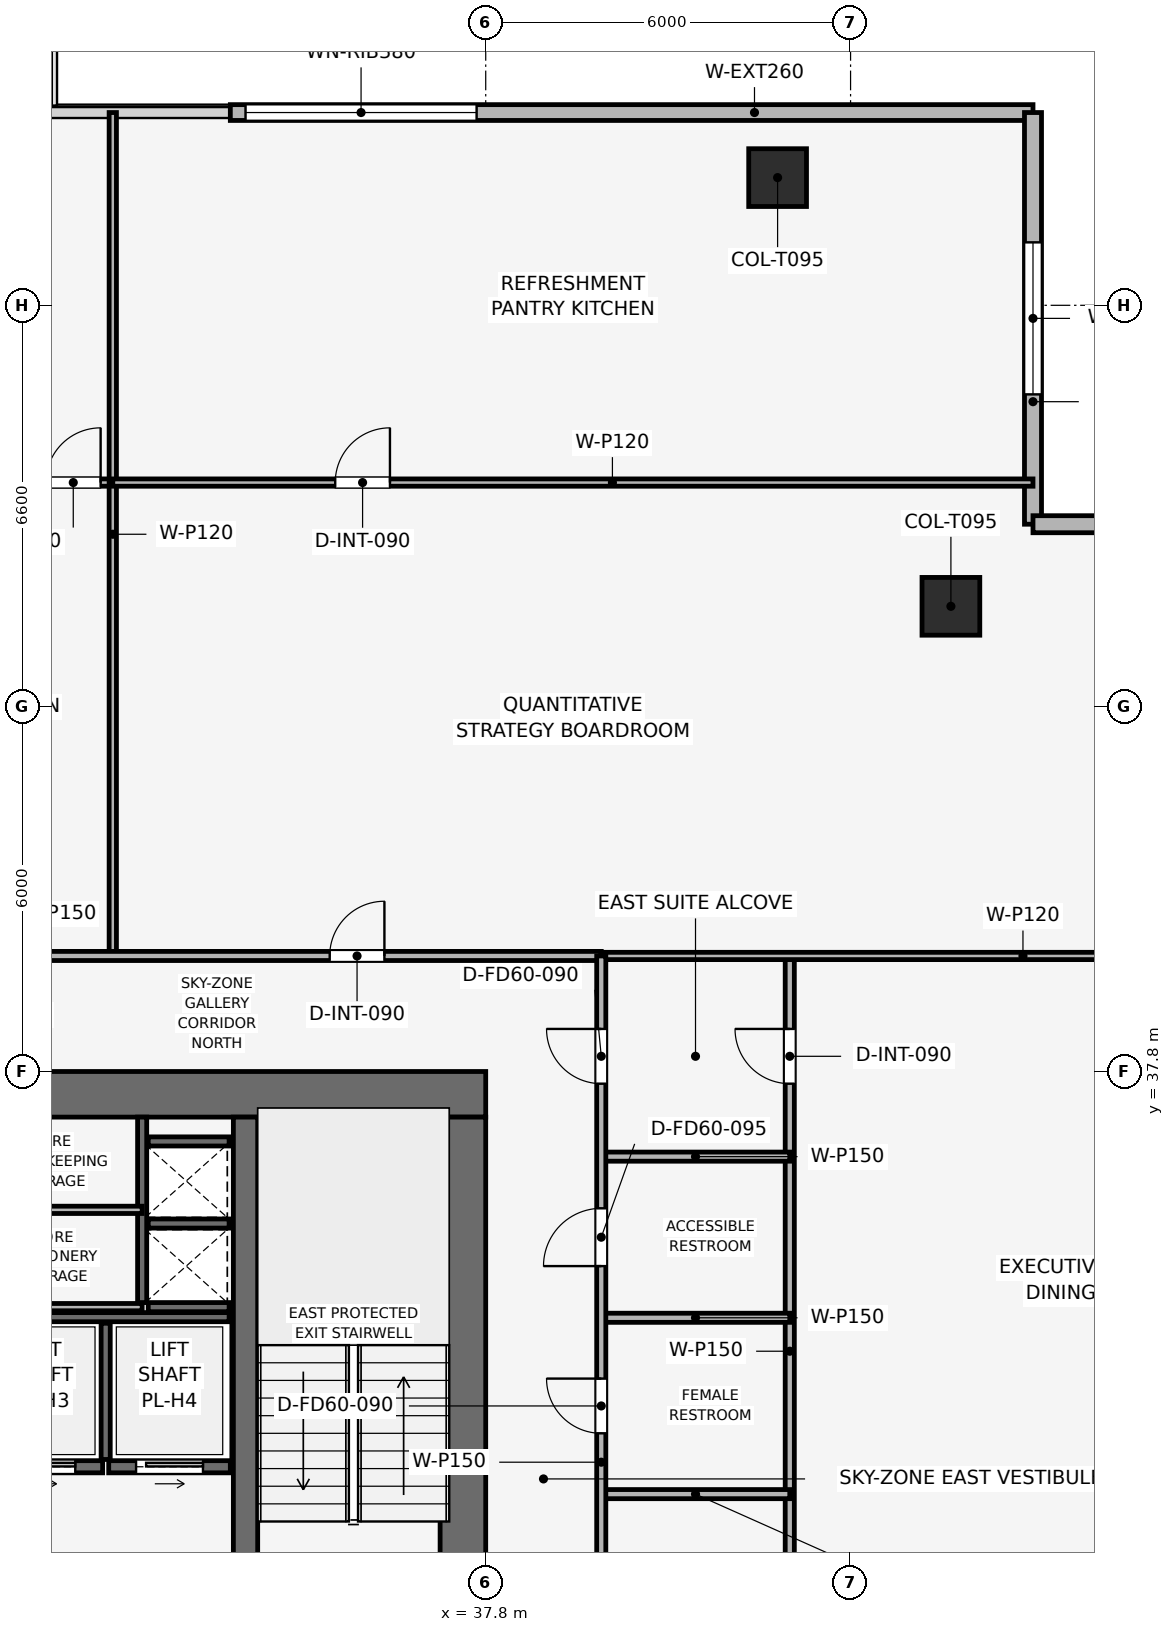
"""IFC4 building model, lengths in metres.
Left out: names, types, materials, properties, quantities, classifications, styles, units other than length and angle.
Written with IfcOpenShell. Run it as: python <this file> out.ifc"""

import sys

from ifc_helpers import new_model, si_unit, direction, frame, frame_2d, origin, origin_2d, place, context, subcontext, project, spatial, rectangle, extrude, element, fill, save


model = new_model("IFC4")
c1 = context("Model", 3, precision=1e-05, world=origin(), true_north=direction((0.0, 1.0)))
c2 = subcontext(c1, "Body", "Model", "MODEL_VIEW")
j1 = project(units=[si_unit("LENGTHUNIT", "METRE"), si_unit("PLANEANGLEUNIT", "RADIAN")], contexts=[c1])
p1 = place(None, origin())
s1 = spatial("IfcSite", under=j1, at=p1, CompositionType="ELEMENT")
p2 = place(p1, origin())
s2 = spatial("IfcBuilding", under=s1, at=p2, CompositionType="ELEMENT")
p3 = place(p2, frame((0.0, 0.0, 269.1)))
s3 = spatial("IfcBuildingStorey", under=s2, at=p3, CompositionType="ELEMENT", Elevation=269.1)
p4 = place(p3, frame((19.8, 37.425, 0.0), z_axis=(0.0, 0.0, 1.0), x_axis=(1.0, 0.0, 0.0)))
e1 = element("IfcWall", 1, at=p4, inside=s3, PredefinedType="SHEAR", context=c2, shape_type="SweptSolid", body=[
    extrude(rectangle(XDim=18.0, YDim=0.75, at=frame_2d((9.0, 0.0))), origin(), (0.0, 0.0, 1.0), 3.75),
])
p5 = place(p4, frame((7.05, 0.0, 0.0)))
e2 = element("IfcOpeningElement", 2, at=p5, cuts=e1, PredefinedType="OPENING", context=c2, shape_type="SweptSolid", body=[
    extrude(rectangle(XDim=1.1, YDim=2.15, at=frame_2d((0.55, 1.075))), frame((0.0, 0.385, 0.0), z_axis=(0.0, -1.0, 0.0), x_axis=(1.0, 0.0, 0.0)), (0.0, 0.0, 1.0), 0.77),
])
p6 = place(p3, frame((37.425, 20.55, 0.0), z_axis=(0.0, 0.0, 1.0), x_axis=(0.0, 1.0, 0.0)))
e3 = element("IfcWall", 3, at=p6, inside=s3, PredefinedType="SHEAR", context=c2, shape_type="SweptSolid", body=[
    extrude(rectangle(XDim=16.5, YDim=0.75, at=frame_2d((8.25, 0.0))), origin(), (0.0, 0.0, 1.0), 3.75),
])
p7 = place(p6, frame((4.75, 0.0, 0.0)))
e4 = element("IfcOpeningElement", 4, at=p7, cuts=e3, PredefinedType="OPENING", context=c2, shape_type="SweptSolid", body=[
    extrude(rectangle(XDim=1.1, YDim=2.15, at=frame_2d((0.55, 1.075))), frame((0.0, 0.385, 0.0), z_axis=(0.0, -1.0, 0.0), x_axis=(1.0, 0.0, 0.0)), (0.0, 0.0, 1.0), 0.77),
])
p8 = place(p3, frame((33.85, 20.55, 0.0), z_axis=(0.0, 0.0, 1.0), x_axis=(0.0, 1.0, 0.0)))
e5 = element("IfcWall", 5, at=p8, inside=s3, PredefinedType="SHEAR", context=c2, shape_type="SweptSolid", body=[
    extrude(rectangle(XDim=16.5, YDim=0.4, at=frame_2d((8.25, 0.0))), origin(), (0.0, 0.0, 1.0), 3.75),
])
for number, where, z_axis, x_axis in (
    (6, (42.6, 52.5, 0.003), (0.0, 0.0, 1.0), (1.0, 0.0, 0.0)),
    (7, (45.45, 45.45, 0.003), (0.0, 0.0, 1.0), (1.0, 0.0, 0.0)),
):
    element("IfcColumn", number, at=place(p3, frame(where, z_axis=z_axis, x_axis=x_axis)), inside=s3, PredefinedType="COLUMN", context=c2, shape_type="SweptSolid", body=[
        extrude(rectangle(XDim=0.95, YDim=0.95, at=origin_2d()), origin(), (0.0, 0.0, 1.0), 3.494),
    ])
p9 = place(p3, frame((33.6, 53.57, 0.0), z_axis=(0.0, 0.0, 1.0), x_axis=(1.0, 0.0, 0.0)))
e8 = element("IfcWall", 8, at=p9, inside=s3, PredefinedType="SOLIDWALL", context=c2, shape_type="SweptSolid", body=[
    extrude(rectangle(XDim=13.2, YDim=0.26, at=frame_2d((6.6, 0.0))), origin(), (0.0, 0.0, 1.0), 3.5),
])
p10 = place(p9, frame((0.25, 0.0, 0.9)))
e9 = element("IfcOpeningElement", 9, at=p10, cuts=e8, PredefinedType="OPENING", context=c2, shape_type="SweptSolid", body=[
    extrude(rectangle(XDim=3.8, YDim=1.9, at=frame_2d((1.9, 0.95))), frame((0.0, 0.14, 0.0), z_axis=(0.0, -1.0, 0.0), x_axis=(1.0, 0.0, 0.0)), (0.0, 0.0, 1.0), 0.28),
])
p11 = place(p3, frame((46.8, 53.57, 0.0), z_axis=(0.0, 0.0, 1.0), x_axis=(0.0, -1.0, 0.0)))
e10 = element("IfcWall", 10, at=p11, inside=s3, PredefinedType="SOLIDWALL", context=c2, shape_type="SweptSolid", body=[
    extrude(rectangle(XDim=6.77, YDim=0.28, at=frame_2d((3.385, 0.0))), origin(), (0.0, 0.0, 1.0), 3.5),
])
p12 = place(p11, frame((2.135, 0.0, 0.9)))
e11 = element("IfcOpeningElement", 11, at=p12, cuts=e10, PredefinedType="OPENING", context=c2, shape_type="SweptSolid", body=[
    extrude(rectangle(XDim=2.5, YDim=1.9, at=frame_2d((1.25, 0.95))), frame((0.0, 0.15, 0.0), z_axis=(0.0, -1.0, 0.0), x_axis=(1.0, 0.0, 0.0)), (0.0, 0.0, 1.0), 0.3),
])
p13 = place(p3, frame((46.8, 46.8, 0.0), z_axis=(0.0, 0.0, 1.0), x_axis=(1.0, 0.0, 0.0)))
e12 = element("IfcWall", 12, at=p13, inside=s3, PredefinedType="SOLIDWALL", context=c2, shape_type="SweptSolid", body=[
    extrude(rectangle(XDim=6.77, YDim=0.28, at=frame_2d((3.385, 0.0))), origin(), (0.0, 0.0, 1.0), 3.5),
])
p14 = place(p13, frame((2.135, 0.0, 0.9)))
e13 = element("IfcOpeningElement", 13, at=p14, cuts=e12, PredefinedType="OPENING", context=c2, shape_type="SweptSolid", body=[
    extrude(rectangle(XDim=2.5, YDim=1.9, at=frame_2d((1.25, 0.95))), frame((0.0, 0.15, 0.0), z_axis=(0.0, -1.0, 0.0), x_axis=(1.0, 0.0, 0.0)), (0.0, 0.0, 1.0), 0.3),
])
p15 = place(p3, frame((32.15, 34.0, 0.0), z_axis=(0.0, 0.0, 1.0), x_axis=(0.0, 1.0, 0.0)))
e14 = element("IfcWall", 14, at=p15, inside=s3, PredefinedType="SHEAR", context=c2, shape_type="SweptSolid", body=[
    extrude(rectangle(XDim=3.05, YDim=0.15, at=frame_2d((1.525, 0.0))), origin(), (0.0, 0.0, 1.0), 3.5),
])
for number, where, z_axis, x_axis in (
    (15, (32.25, 33.925, 0.0), (0.0, 0.0, 1.0), (1.0, 0.0, 0.0)),
    (16, (32.25, 35.3, 0.0), (0.0, 0.0, 1.0), (1.0, 0.0, 0.0)),
):
    element("IfcWall", number, at=place(p3, frame(where, z_axis=z_axis, x_axis=x_axis)), inside=s3, PredefinedType="SHEAR", context=c2, shape_type="SweptSolid", body=[
        extrude(rectangle(XDim=1.33, YDim=0.15, at=frame_2d((0.665, 0.0))), origin(), (0.0, 0.0, 1.0), 3.5),
    ])
p16 = place(p3, frame((29.5, 31.3, 0.0), z_axis=(0.0, 0.0, 1.0), x_axis=(1.0, 0.0, 0.0)))
e17 = element("IfcWall", 17, at=p16, inside=s3, PredefinedType="SHEAR", context=c2, shape_type="SweptSolid", body=[
    extrude(rectangle(XDim=2.0, YDim=0.2, at=frame_2d((1.0, 0.0))), origin(), (0.0, 0.0, 1.0), 3.5),
])
p17 = place(p16, frame((0.45, 0.0, 0.0)))
e18 = element("IfcOpeningElement", 18, at=p17, cuts=e17, PredefinedType="OPENING", context=c2, shape_type="SweptSolid", body=[
    extrude(rectangle(XDim=1.1, YDim=2.15, at=frame_2d((0.55, 1.075))), frame((0.0, 0.11, 0.0), z_axis=(0.0, -1.0, 0.0), x_axis=(1.0, 0.0, 0.0)), (0.0, 0.0, 1.0), 0.22),
])
p18 = place(p3, frame((31.6, 31.3, 0.0), z_axis=(0.0, 0.0, 1.0), x_axis=(1.0, 0.0, 0.0)))
e19 = element("IfcWall", 19, at=p18, inside=s3, PredefinedType="SHEAR", context=c2, shape_type="SweptSolid", body=[
    extrude(rectangle(XDim=2.0, YDim=0.2, at=frame_2d((1.0, 0.0))), origin(), (0.0, 0.0, 1.0), 3.5),
])
p19 = place(p18, frame((0.45, 0.0, 0.0)))
e20 = element("IfcOpeningElement", 20, at=p19, cuts=e19, PredefinedType="OPENING", context=c2, shape_type="SweptSolid", body=[
    extrude(rectangle(XDim=1.1, YDim=2.15, at=frame_2d((0.55, 1.075))), frame((0.0, 0.11, 0.0), z_axis=(0.0, -1.0, 0.0), x_axis=(1.0, 0.0, 0.0)), (0.0, 0.0, 1.0), 0.22),
])
p20 = place(p3, frame((32.25, 36.65, 0.0), z_axis=(0.0, 0.0, 1.0), x_axis=(1.0, 0.0, 0.0)))
e21 = element("IfcWall", 21, at=p20, inside=s3, PredefinedType="SHEAR", context=c2, shape_type="SweptSolid", body=[
    extrude(rectangle(XDim=1.33, YDim=0.15, at=frame_2d((0.665, 0.0))), origin(), (0.0, 0.0, 1.0), 3.5),
])
p21 = place(p3, frame((29.5, 33.76, 0.0), z_axis=(0.0, 0.0, 1.0), x_axis=(1.0, 0.0, 0.0)))
e22 = element("IfcWall", 22, at=p21, inside=s3, PredefinedType="SHEAR", context=c2, shape_type="SweptSolid", body=[
    extrude(rectangle(XDim=4.08, YDim=0.15, at=frame_2d((2.04, 0.0))), origin(), (0.0, 0.0, 1.0), 3.5),
])
p22 = place(p3, frame((31.55, 31.42, 0.0), z_axis=(0.0, 0.0, 1.0), x_axis=(0.0, 1.0, 0.0)))
e23 = element("IfcWall", 23, at=p22, inside=s3, PredefinedType="SHEAR", context=c2, shape_type="SweptSolid", body=[
    extrude(rectangle(XDim=2.24, YDim=0.15, at=frame_2d((1.12, 0.0))), origin(), (0.0, 0.0, 1.0), 3.5),
])
for number, where, z_axis, x_axis in (
    (24, (28.85, 35.525, 0.0), (0.0, 0.0, 1.0), (1.0, 0.0, 0.0)),
    (25, (28.85, 33.925, 0.0), (0.0, 0.0, 1.0), (1.0, 0.0, 0.0)),
):
    element("IfcWall", number, at=place(p3, frame(where, z_axis=z_axis, x_axis=x_axis)), inside=s3, PredefinedType="PARTITIONING", context=c2, shape_type="SweptSolid", body=[
        extrude(rectangle(XDim=3.3, YDim=0.12, at=frame_2d((1.65, 0.0))), origin(), (0.0, 0.0, 1.0), 3.5),
    ])
p23 = place(p3, frame((26.102, 47.485, 0.0), z_axis=(0.0, 0.0, 1.0), x_axis=(1.0, 0.0, 0.0)))
e26 = element("IfcWall", 26, at=p23, inside=s3, PredefinedType="PARTITIONING", context=c2, shape_type="SweptSolid", body=[
    extrude(rectangle(XDim=5.565, YDim=0.12, at=frame_2d((2.782, 0.0))), origin(), (0.0, 0.0, 1.0), 3.085),
])
p24 = place(p23, frame((4.465, 0.0, 0.0)))
e27 = element("IfcOpeningElement", 27, at=p24, cuts=e26, PredefinedType="OPENING", context=c2, shape_type="SweptSolid", body=[
    extrude(rectangle(XDim=0.9, YDim=2.1, at=frame_2d((0.45, 1.05))), frame((0.0, 0.07, 0.0), z_axis=(0.0, -1.0, 0.0), x_axis=(1.0, 0.0, 0.0)), (0.0, 0.0, 1.0), 0.14),
])
p25 = place(p3, frame((31.667, 39.7, 0.0), z_axis=(0.0, 0.0, 1.0), x_axis=(0.0, 1.0, 0.0)))
e28 = element("IfcWall", 28, at=p25, inside=s3, PredefinedType="PARTITIONING", context=c2, shape_type="SweptSolid", body=[
    extrude(rectangle(XDim=13.87, YDim=0.12, at=frame_2d((6.935, 0.0))), origin(), (0.0, 0.0, 1.0), 3.085),
])
p26 = place(p3, frame((31.667, 47.485, 0.0), z_axis=(0.0, 0.0, 1.0), x_axis=(1.0, 0.0, 0.0)))
e29 = element("IfcWall", 29, at=p26, inside=s3, PredefinedType="PARTITIONING", context=c2, shape_type="SweptSolid", body=[
    extrude(rectangle(XDim=15.133, YDim=0.12, at=frame_2d((7.566, 0.0))), origin(), (0.0, 0.0, 1.0), 3.085),
])
p27 = place(p26, frame((3.658, 0.0, 0.0)))
e30 = element("IfcOpeningElement", 30, at=p27, cuts=e29, PredefinedType="OPENING", context=c2, shape_type="SweptSolid", body=[
    extrude(rectangle(XDim=0.9, YDim=2.1, at=frame_2d((0.45, 1.05))), frame((0.0, 0.07, 0.0), z_axis=(0.0, -1.0, 0.0), x_axis=(1.0, 0.0, 0.0)), (0.0, 0.0, 1.0), 0.14),
])
p28 = place(p3, frame((42.8, 28.0, 0.0), z_axis=(0.0, 0.0, 1.0), x_axis=(0.0, 1.0, 0.0)))
e31 = element("IfcWall", 31, at=p28, inside=s3, PredefinedType="PARTITIONING", context=c2, shape_type="SweptSolid", body=[
    extrude(rectangle(XDim=11.7, YDim=0.15, at=frame_2d((5.85, 0.0))), origin(), (0.0, 0.0, 1.0), 3.085),
])
p29 = place(p28, frame((9.6, 0.0, 0.0)))
e32 = element("IfcOpeningElement", 32, at=p29, cuts=e31, PredefinedType="OPENING", context=c2, shape_type="SweptSolid", body=[
    extrude(rectangle(XDim=0.9, YDim=2.1, at=frame_2d((0.45, 1.05))), frame((0.0, 0.085, 0.0), z_axis=(0.0, -1.0, 0.0), x_axis=(1.0, 0.0, 0.0)), (0.0, 0.0, 1.0), 0.17),
])
for number, where, z_axis, x_axis in (
    (33, (39.7, 36.4, 0.0), (0.0, 0.0, 1.0), (1.0, 0.0, 0.0)),
    (34, (39.7, 30.85, 0.0), (0.0, 0.0, 1.0), (1.0, 0.0, 0.0)),
    (35, (39.7, 33.75, 0.0), (0.0, 0.0, 1.0), (1.0, 0.0, 0.0)),
):
    element("IfcWall", number, at=place(p3, frame(where, z_axis=z_axis, x_axis=x_axis)), inside=s3, PredefinedType="PARTITIONING", context=c2, shape_type="SweptSolid", body=[
        extrude(rectangle(XDim=3.1, YDim=0.15, at=frame_2d((1.55, 0.0))), origin(), (0.0, 0.0, 1.0), 3.5),
    ])
p30 = place(p3, frame((39.7, 39.7, 0.0), z_axis=(0.0, 0.0, 1.0), x_axis=(1.0, 0.0, 0.0)))
e36 = element("IfcWall", 36, at=p30, inside=s3, PredefinedType="PARTITIONING", context=c2, shape_type="SweptSolid", body=[
    extrude(rectangle(XDim=13.87, YDim=0.12, at=frame_2d((6.935, 0.0))), origin(), (0.0, 0.0, 1.0), 3.085),
])
p31 = place(p3, frame((17.9, 39.7, 0.0), z_axis=(0.0, 0.0, 1.0), x_axis=(1.0, 0.0, 0.0)))
e37 = element("IfcWall", 37, at=p31, inside=s3, PredefinedType="PARTITIONING", context=c2, shape_type="SweptSolid", body=[
    extrude(rectangle(XDim=21.8, YDim=0.15, at=frame_2d((10.9, 0.0))), origin(), (0.0, 0.0, 1.0), 3.085),
])
p32 = place(p31, frame((0.7, 0.0, 0.0)))
e38 = element("IfcOpeningElement", 38, at=p32, cuts=e37, PredefinedType="OPENING", context=c2, shape_type="SweptSolid", body=[
    extrude(rectangle(XDim=0.9, YDim=2.1, at=frame_2d((0.45, 1.05))), frame((0.0, 0.085, 0.0), z_axis=(0.0, -1.0, 0.0), x_axis=(1.0, 0.0, 0.0)), (0.0, 0.0, 1.0), 0.17),
])
p33 = place(p31, frame((4.801, 0.0, 0.0)))
e39 = element("IfcOpeningElement", 39, at=p33, cuts=e37, PredefinedType="OPENING", context=c2, shape_type="SweptSolid", body=[
    extrude(rectangle(XDim=0.9, YDim=2.1, at=frame_2d((0.45, 1.05))), frame((0.0, 0.085, 0.0), z_axis=(0.0, -1.0, 0.0), x_axis=(1.0, 0.0, 0.0)), (0.0, 0.0, 1.0), 0.17),
])
p34 = place(p31, frame((10.535, 0.0, 0.0)))
e40 = element("IfcOpeningElement", 40, at=p34, cuts=e37, PredefinedType="OPENING", context=c2, shape_type="SweptSolid", body=[
    extrude(rectangle(XDim=0.9, YDim=2.1, at=frame_2d((0.45, 1.05))), frame((0.0, 0.085, 0.0), z_axis=(0.0, -1.0, 0.0), x_axis=(1.0, 0.0, 0.0)), (0.0, 0.0, 1.0), 0.17),
])
p35 = place(p31, frame((17.334, 0.0, 0.0)))
e41 = element("IfcOpeningElement", 41, at=p35, cuts=e37, PredefinedType="OPENING", context=c2, shape_type="SweptSolid", body=[
    extrude(rectangle(XDim=0.9, YDim=2.1, at=frame_2d((0.45, 1.05))), frame((0.0, 0.085, 0.0), z_axis=(0.0, -1.0, 0.0), x_axis=(1.0, 0.0, 0.0)), (0.0, 0.0, 1.0), 0.17),
])
p36 = place(p3, frame((39.7, 24.4, 0.0), z_axis=(0.0, 0.0, 1.0), x_axis=(0.0, 1.0, 0.0)))
e42 = element("IfcWall", 42, at=p36, inside=s3, PredefinedType="PARTITIONING", context=c2, shape_type="SweptSolid", body=[
    extrude(rectangle(XDim=15.3, YDim=0.15, at=frame_2d((7.65, 0.0))), origin(), (0.0, 0.0, 1.0), 3.085),
])
p37 = place(p36, frame((1.35, 0.0, 0.0)))
e43 = element("IfcOpeningElement", 43, at=p37, cuts=e42, PredefinedType="OPENING", context=c2, shape_type="SweptSolid", body=[
    extrude(rectangle(XDim=0.9, YDim=2.1, at=frame_2d((0.45, 1.05))), frame((0.0, 0.085, 0.0), z_axis=(0.0, -1.0, 0.0), x_axis=(1.0, 0.0, 0.0)), (0.0, 0.0, 1.0), 0.17),
])
p38 = place(p36, frame((4.55, 0.0, 0.0)))
e44 = element("IfcOpeningElement", 44, at=p38, cuts=e42, PredefinedType="OPENING", context=c2, shape_type="SweptSolid", body=[
    extrude(rectangle(XDim=0.9, YDim=2.1, at=frame_2d((0.45, 1.05))), frame((0.0, 0.085, 0.0), z_axis=(0.0, -1.0, 0.0), x_axis=(1.0, 0.0, 0.0)), (0.0, 0.0, 1.0), 0.17),
])
p39 = place(p36, frame((7.45, 0.0, 0.0)))
e45 = element("IfcOpeningElement", 45, at=p39, cuts=e42, PredefinedType="OPENING", context=c2, shape_type="SweptSolid", body=[
    extrude(rectangle(XDim=0.9, YDim=2.1, at=frame_2d((0.45, 1.05))), frame((0.0, 0.085, 0.0), z_axis=(0.0, -1.0, 0.0), x_axis=(1.0, 0.0, 0.0)), (0.0, 0.0, 1.0), 0.17),
])
p40 = place(p36, frame((10.2, 0.0, 0.0)))
e46 = element("IfcOpeningElement", 46, at=p40, cuts=e42, PredefinedType="OPENING", context=c2, shape_type="SweptSolid", body=[
    extrude(rectangle(XDim=0.95, YDim=2.1, at=frame_2d((0.475, 1.05))), frame((0.0, 0.085, 0.0), z_axis=(0.0, -1.0, 0.0), x_axis=(1.0, 0.0, 0.0)), (0.0, 0.0, 1.0), 0.17),
])
p41 = place(p36, frame((13.2, 0.0, 0.0)))
e47 = element("IfcOpeningElement", 47, at=p41, cuts=e42, PredefinedType="OPENING", context=c2, shape_type="SweptSolid", body=[
    extrude(rectangle(XDim=0.9, YDim=2.1, at=frame_2d((0.45, 1.05))), frame((0.0, 0.085, 0.0), z_axis=(0.0, -1.0, 0.0), x_axis=(1.0, 0.0, 0.0)), (0.0, 0.0, 1.0), 0.17),
])
p42 = place(p10, origin())
e48 = element("IfcWindow", 48, at=p42, inside=s3, PartitioningType="SINGLE_PANEL", PredefinedType="WINDOW", context=c2, shape_type="SweptSolid", body=[
    extrude(rectangle(XDim=3.8, YDim=1.9, at=frame_2d((1.9, 0.95))), frame((0.0, 0.03, 0.0), z_axis=(0.0, -1.0, 0.0), x_axis=(1.0, 0.0, 0.0)), (0.0, 0.0, 1.0), 0.06),
])
fill(e9, e48)
p43 = place(p12, origin())
e49 = element("IfcWindow", 49, at=p43, inside=s3, PartitioningType="SINGLE_PANEL", PredefinedType="WINDOW", context=c2, shape_type="SweptSolid", body=[
    extrude(rectangle(XDim=2.5, YDim=1.9, at=frame_2d((1.25, 0.95))), frame((0.0, 0.03, 0.0), z_axis=(0.0, -1.0, 0.0), x_axis=(1.0, 0.0, 0.0)), (0.0, 0.0, 1.0), 0.06),
])
fill(e11, e49)
p44 = place(p17, origin())
e50 = element("IfcDoor", 50, at=p44, inside=s3, OperationType="SLIDING_TO_RIGHT", PredefinedType="DOOR", context=c2, shape_type="SweptSolid", body=[
    extrude(rectangle(XDim=1.1, YDim=2.15, at=frame_2d((0.55, 1.075))), frame((0.0, 0.025, 0.0), z_axis=(0.0, -1.0, 0.0), x_axis=(1.0, 0.0, 0.0)), (0.0, 0.0, 1.0), 0.05),
])
fill(e18, e50)
p45 = place(p19, origin())
e51 = element("IfcDoor", 51, at=p45, inside=s3, OperationType="SLIDING_TO_RIGHT", PredefinedType="DOOR", context=c2, shape_type="SweptSolid", body=[
    extrude(rectangle(XDim=1.1, YDim=2.15, at=frame_2d((0.55, 1.075))), frame((0.0, 0.025, 0.0), z_axis=(0.0, -1.0, 0.0), x_axis=(1.0, 0.0, 0.0)), (0.0, 0.0, 1.0), 0.05),
])
fill(e20, e51)
p46 = place(p24, origin())
e52 = element("IfcDoor", 52, at=p46, inside=s3, OperationType="SINGLE_SWING_RIGHT", PredefinedType="DOOR", context=c2, shape_type="SweptSolid", body=[
    extrude(rectangle(XDim=0.9, YDim=2.1, at=frame_2d((0.45, 1.05))), frame((0.0, 0.025, 0.0), z_axis=(0.0, -1.0, 0.0), x_axis=(1.0, 0.0, 0.0)), (0.0, 0.0, 1.0), 0.05),
])
fill(e27, e52)
p47 = place(p27, origin())
e53 = element("IfcDoor", 53, at=p47, inside=s3, OperationType="SINGLE_SWING_RIGHT", PredefinedType="DOOR", context=c2, shape_type="SweptSolid", body=[
    extrude(rectangle(XDim=0.9, YDim=2.1, at=frame_2d((0.45, 1.05))), frame((0.0, 0.025, 0.0), z_axis=(0.0, -1.0, 0.0), x_axis=(1.0, 0.0, 0.0)), (0.0, 0.0, 1.0), 0.05),
])
fill(e30, e53)
p48 = place(p29, origin())
e54 = element("IfcDoor", 54, at=p48, inside=s3, OperationType="SINGLE_SWING_RIGHT", PredefinedType="DOOR", context=c2, shape_type="SweptSolid", body=[
    extrude(rectangle(XDim=0.9, YDim=2.1, at=frame_2d((0.45, 1.05))), frame((0.0, 0.025, 0.0), z_axis=(0.0, -1.0, 0.0), x_axis=(1.0, 0.0, 0.0)), (0.0, 0.0, 1.0), 0.05),
])
fill(e32, e54)
p49 = place(p35, origin())
e55 = element("IfcDoor", 55, at=p49, inside=s3, OperationType="SINGLE_SWING_RIGHT", PredefinedType="DOOR", context=c2, shape_type="SweptSolid", body=[
    extrude(rectangle(XDim=0.9, YDim=2.1, at=frame_2d((0.45, 1.05))), frame((0.0, 0.025, 0.0), z_axis=(0.0, -1.0, 0.0), x_axis=(1.0, 0.0, 0.0)), (0.0, 0.0, 1.0), 0.05),
])
fill(e41, e55)
p50 = place(p39, origin())
e56 = element("IfcDoor", 56, at=p50, inside=s3, OperationType="SINGLE_SWING_RIGHT", PredefinedType="DOOR", context=c2, shape_type="SweptSolid", body=[
    extrude(rectangle(XDim=0.9, YDim=2.1, at=frame_2d((0.45, 1.05))), frame((0.0, 0.025, 0.0), z_axis=(0.0, -1.0, 0.0), x_axis=(1.0, 0.0, 0.0)), (0.0, 0.0, 1.0), 0.05),
])
fill(e45, e56)
p51 = place(p40, origin())
e57 = element("IfcDoor", 57, at=p51, inside=s3, OperationType="SINGLE_SWING_LEFT", PredefinedType="DOOR", context=c2, shape_type="SweptSolid", body=[
    extrude(rectangle(XDim=0.95, YDim=2.1, at=frame_2d((0.475, 1.05))), frame((0.0, 0.025, 0.0), z_axis=(0.0, -1.0, 0.0), x_axis=(1.0, 0.0, 0.0)), (0.0, 0.0, 1.0), 0.05),
])
fill(e46, e57)
p52 = place(p41, origin())
e58 = element("IfcDoor", 58, at=p52, inside=s3, OperationType="SINGLE_SWING_RIGHT", PredefinedType="DOOR", context=c2, shape_type="SweptSolid", body=[
    extrude(rectangle(XDim=0.9, YDim=2.1, at=frame_2d((0.45, 1.05))), frame((0.0, 0.025, 0.0), z_axis=(0.0, -1.0, 0.0), x_axis=(1.0, 0.0, 0.0)), (0.0, 0.0, 1.0), 0.05),
])
fill(e47, e58)
save(model, sys.argv[1])
